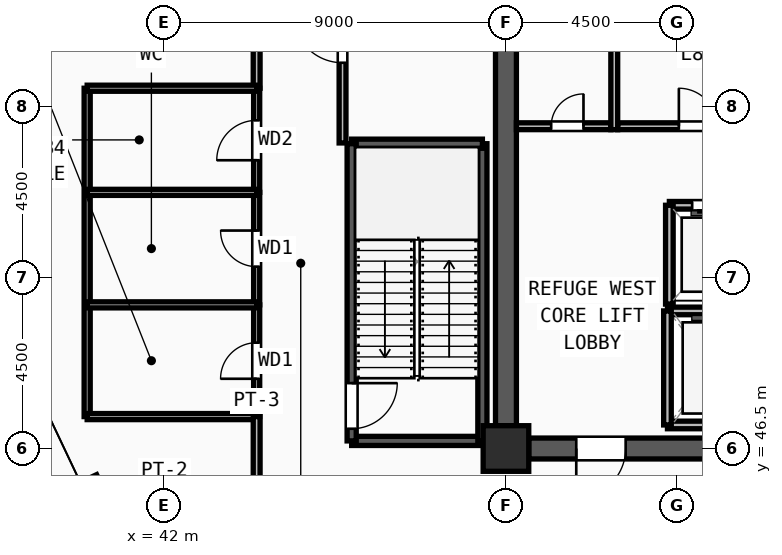
"""IFC4 building model, lengths in metres.
Left out: names, types, materials, properties, quantities, classifications, styles, units other than length and angle.
Written with IfcOpenShell. Run it as: python <this file> out.ifc"""

import sys

from ifc_helpers import new_model, si_unit, direction, frame, frame_2d, origin, origin_2d, place, context, subcontext, project, spatial, rectangle, extrude, source, transform, mapped, element, fill, save


model = new_model("IFC4")
c1 = context("Model", 3, precision=1e-05, world=origin(), true_north=direction((0.0, 1.0)))
c2 = subcontext(c1, "Body", "Model", "MODEL_VIEW")
j1 = project(units=[si_unit("LENGTHUNIT", "METRE"), si_unit("PLANEANGLEUNIT", "RADIAN")], contexts=[c1])
p1 = place(None, origin())
s1 = spatial("IfcSite", under=j1, at=p1, CompositionType="ELEMENT")
p2 = place(p1, origin())
s2 = spatial("IfcBuilding", under=s1, at=p2, CompositionType="ELEMENT")
p3 = place(p2, frame((0.0, 0.0, 324.0)))
s3 = spatial("IfcBuildingStorey", under=s2, at=p3, CompositionType="ELEMENT", Elevation=324.0)
m1 = source(origin(), c2, "Body", "SweptSolid", [
    extrude(rectangle(XDim=1.2, YDim=1.2, at=origin_2d()), origin(), (0.0, 0.0, 1.0), 4.5),
])
p4 = place(p3, frame((51.0, 46.5, 0.0), z_axis=(0.0, 0.0, 1.0), x_axis=(1.0, 0.0, 0.0)))
e1 = element("IfcColumn", 1, at=p4, inside=s3, PredefinedType="COLUMN", context=c2, shape_type="MappedRepresentation", body=[
    mapped(m1, transform((0.0, 0.0, 0.0), x_axis=(1.0, 0.0, 0.0), y_axis=(0.0, 1.0, 0.0), z_axis=(0.0, 0.0, 1.0), scale=1.0)),
])
m2 = source(origin(), c2, "Body", "SweptSolid", [
    extrude(rectangle(XDim=1.1, YDim=0.95, at=origin_2d()), origin(), (0.0, 0.0, 1.0), 4.5),
])
p5 = place(p3, frame((40.035, 45.112, 0.0), z_axis=(0.0, 0.0, 1.0), x_axis=(-0.427988927879, 0.903783977294, 0.0)))
e2 = element("IfcColumn", 2, at=p5, inside=s3, PredefinedType="COLUMN", context=c2, shape_type="MappedRepresentation", body=[
    mapped(m2, transform((0.0, 0.0, 0.0), x_axis=(1.0, 0.0, 0.0), y_axis=(0.0, 1.0, 0.0), z_axis=(0.0, 0.0, 1.0), scale=1.0)),
])
p6 = place(p3, frame((59.4, 46.5, 0.0), z_axis=(0.0, 0.0, 1.0), x_axis=(-1.0, 0.0, 0.0)))
e3 = element("IfcWall", 3, at=p6, inside=s3, PredefinedType="SHEAR", context=c2, shape_type="SweptSolid", body=[
    extrude(rectangle(XDim=7.8, YDim=0.55, at=frame_2d((3.9, 0.0))), origin(), (0.0, 0.0, 1.0), 4.32),
])
m3 = source(origin(), c2, "Body", "SweptSolid", [
    extrude(rectangle(XDim=1.3, YDim=2.2, at=frame_2d((0.65, 1.1))), frame((0.0, 0.285, 0.0), z_axis=(0.0, -1.0, 0.0), x_axis=(1.0, 0.0, 0.0)), (0.0, 0.0, 1.0), 0.57),
])
p7 = place(p6, frame((5.25, 0.0, 0.0)))
e4 = element("IfcOpeningElement", 4, at=p7, cuts=e3, PredefinedType="OPENING", context=c2, shape_type="MappedRepresentation", body=[
    mapped(m3, transform((0.0, 0.0, 0.0), x_axis=(1.0, 0.0, 0.0), y_axis=(0.0, 1.0, 0.0), z_axis=(0.0, 0.0, 1.0), scale=1.0)),
])
m4 = source(origin(), c2, "Body", "SweptSolid", [
    extrude(rectangle(XDim=1.0, YDim=2.2, at=frame_2d((0.5, 1.1))), frame((0.0, 0.285, 0.0), z_axis=(0.0, -1.0, 0.0), x_axis=(1.0, 0.0, 0.0)), (0.0, 0.0, 1.0), 0.57),
])
p8 = place(p6, frame((0.75, 0.0, 0.0)))
e5 = element("IfcOpeningElement", 5, at=p8, cuts=e3, PredefinedType="OPENING", context=c2, shape_type="MappedRepresentation", body=[
    mapped(m4, transform((0.0, 0.0, 0.0), x_axis=(1.0, 0.0, 0.0), y_axis=(0.0, 1.0, 0.0), z_axis=(0.0, 0.0, 1.0), scale=1.0)),
])
p9 = place(p3, frame((51.0, 47.1, 0.0), z_axis=(0.0, 0.0, 1.0), x_axis=(0.0, 1.0, 0.0)))
e6 = element("IfcWall", 6, at=p9, inside=s3, PredefinedType="SHEAR", context=c2, shape_type="SweptSolid", body=[
    extrude(rectangle(XDim=13.8, YDim=0.55, at=frame_2d((6.9, 0.0))), origin(), (0.0, 0.0, 1.0), 4.32),
])
p10 = place(p3, frame((46.94, 46.7, 0.0), z_axis=(0.0, 0.0, 1.0), x_axis=(1.0, 0.0, 0.0)))
e7 = element("IfcWall", 7, at=p10, inside=s3, PredefinedType="SOLIDWALL", context=c2, shape_type="SweptSolid", body=[
    extrude(rectangle(XDim=3.44, YDim=0.24, at=frame_2d((1.72, 0.0))), origin(), (0.0, 0.0, 1.0), 4.32),
])
p11 = place(p3, frame((50.38, 46.7, 0.0), z_axis=(0.0, 0.0, 1.0), x_axis=(0.0, 1.0, 0.0)))
e8 = element("IfcWall", 8, at=p11, inside=s3, PredefinedType="SOLIDWALL", context=c2, shape_type="SweptSolid", body=[
    extrude(rectangle(XDim=7.82, YDim=0.24, at=frame_2d((3.91, 0.0))), origin(), (0.0, 0.0, 1.0), 4.32),
])
p12 = place(p3, frame((50.38, 54.52, 0.0), z_axis=(0.0, 0.0, 1.0), x_axis=(-1.0, 0.0, 0.0)))
e9 = element("IfcWall", 9, at=p12, inside=s3, PredefinedType="SOLIDWALL", context=c2, shape_type="SweptSolid", body=[
    extrude(rectangle(XDim=3.44, YDim=0.24, at=frame_2d((1.72, 0.0))), origin(), (0.0, 0.0, 1.0), 4.32),
])
p13 = place(p3, frame((46.94, 54.52, 0.0), z_axis=(0.0, 0.0, 1.0), x_axis=(0.0, -1.0, 0.0)))
e10 = element("IfcWall", 10, at=p13, inside=s3, PredefinedType="SOLIDWALL", context=c2, shape_type="SweptSolid", body=[
    extrude(rectangle(XDim=7.82, YDim=0.24, at=frame_2d((3.91, 0.0))), origin(), (0.0, 0.0, 1.0), 4.32),
])
m5 = source(origin(), c2, "Body", "SweptSolid", [
    extrude(rectangle(XDim=1.2, YDim=2.2, at=frame_2d((0.6, 1.1))), frame((0.0, 0.13, 0.0), z_axis=(0.0, -1.0, 0.0), x_axis=(1.0, 0.0, 0.0)), (0.0, 0.0, 1.0), 0.26),
])
p14 = place(p13, frame((6.3, 0.0, 0.0)))
e11 = element("IfcOpeningElement", 11, at=p14, cuts=e10, PredefinedType="OPENING", context=c2, shape_type="MappedRepresentation", body=[
    mapped(m5, transform((0.0, 0.0, 0.0), x_axis=(1.0, 0.0, 0.0), y_axis=(0.0, 1.0, 0.0), z_axis=(0.0, 0.0, 1.0), scale=1.0)),
])
for number, where, z_axis, x_axis in (
    (12, (55.25, 47.12, 0.0), (0.0, 0.0, 1.0), (1.0, 0.0, 0.0)),
    (13, (57.65, 50.12, 0.0), (0.0, 0.0, 1.0), (-1.0, 0.0, 0.0)),
):
    element("IfcWall", number, at=place(p3, frame(where, z_axis=z_axis, x_axis=x_axis)), inside=s3, PredefinedType="SOLIDWALL", context=c2, shape_type="SweptSolid", body=[
        extrude(rectangle(XDim=2.4, YDim=0.2, at=frame_2d((1.2, 0.0))), origin(), (0.0, 0.0, 1.0), 4.32),
    ])
p15 = place(p3, frame((55.25, 50.12, 0.0), z_axis=(0.0, 0.0, 1.0), x_axis=(0.0, -1.0, 0.0)))
e14 = element("IfcWall", 14, at=p15, inside=s3, PredefinedType="SOLIDWALL", context=c2, shape_type="SweptSolid", body=[
    extrude(rectangle(XDim=3.0, YDim=0.2, at=frame_2d((1.5, 0.0))), origin(), (0.0, 0.0, 1.0), 4.32),
])
p16 = place(p3, frame((57.6, 52.9, 0.0), z_axis=(0.0, 0.0, 1.0), x_axis=(-1.0, 0.0, 0.0)))
e15 = element("IfcWall", 15, at=p16, inside=s3, PredefinedType="SOLIDWALL", context=c2, shape_type="SweptSolid", body=[
    extrude(rectangle(XDim=2.3, YDim=0.2, at=frame_2d((1.15, 0.0))), origin(), (0.0, 0.0, 1.0), 4.32),
])
m6 = source(origin(), c2, "Body", "SweptSolid", [
    extrude(rectangle(XDim=1.1, YDim=2.2, at=frame_2d((0.55, 1.1))), frame((0.0, 0.11, 0.0), z_axis=(0.0, -1.0, 0.0), x_axis=(1.0, 0.0, 0.0)), (0.0, 0.0, 1.0), 0.22),
])
p17 = place(p16, frame((0.6, 0.0, 0.0)))
e16 = element("IfcOpeningElement", 16, at=p17, cuts=e15, PredefinedType="OPENING", context=c2, shape_type="MappedRepresentation", body=[
    mapped(m6, transform((0.0, 0.0, 0.0), x_axis=(1.0, 0.0, 0.0), y_axis=(0.0, 1.0, 0.0), z_axis=(0.0, 0.0, 1.0), scale=1.0)),
])
p18 = place(p3, frame((55.3, 52.9, 0.0), z_axis=(0.0, 0.0, 1.0), x_axis=(0.0, -1.0, 0.0)))
e17 = element("IfcWall", 17, at=p18, inside=s3, PredefinedType="SOLIDWALL", context=c2, shape_type="SweptSolid", body=[
    extrude(rectangle(XDim=2.6, YDim=0.2, at=frame_2d((1.3, 0.0))), origin(), (0.0, 0.0, 1.0), 4.32),
])
p19 = place(p3, frame((53.94, 54.98, 0.0), z_axis=(0.0, 0.0, 1.0), x_axis=(1.0, 0.0, 0.0)))
e18 = element("IfcWall", 18, at=p19, inside=s3, PredefinedType="PARTITIONING", context=c2, shape_type="SweptSolid", body=[
    extrude(rectangle(XDim=4.22, YDim=0.18, at=frame_2d((2.11, 0.0))), origin(), (0.0, 0.0, 1.0), 4.32),
])
m7 = source(origin(), c2, "Body", "SweptSolid", [
    extrude(rectangle(XDim=1.0, YDim=2.2, at=frame_2d((0.5, 1.1))), frame((0.0, 0.1, 0.0), z_axis=(0.0, -1.0, 0.0), x_axis=(1.0, 0.0, 0.0)), (0.0, 0.0, 1.0), 0.2),
])
p20 = place(p19, frame((1.61, 0.0, 0.0)))
e19 = element("IfcOpeningElement", 19, at=p20, cuts=e18, PredefinedType="OPENING", context=c2, shape_type="MappedRepresentation", body=[
    mapped(m7, transform((0.0, 0.0, 0.0), x_axis=(1.0, 0.0, 0.0), y_axis=(0.0, 1.0, 0.0), z_axis=(0.0, 0.0, 1.0), scale=1.0)),
])
p21 = place(p3, frame((51.275, 54.98, 0.0), z_axis=(0.0, 0.0, 1.0), x_axis=(1.0, 0.0, 0.0)))
e20 = element("IfcWall", 20, at=p21, inside=s3, PredefinedType="PARTITIONING", context=c2, shape_type="SweptSolid", body=[
    extrude(rectangle(XDim=2.485, YDim=0.18, at=frame_2d((1.243, 0.0))), origin(), (0.0, 0.0, 1.0), 4.32),
])
m8 = source(origin(), c2, "Body", "SweptSolid", [
    extrude(rectangle(XDim=0.85, YDim=2.1, at=frame_2d((0.425, 1.05))), frame((0.0, 0.1, 0.0), z_axis=(0.0, -1.0, 0.0), x_axis=(1.0, 0.0, 0.0)), (0.0, 0.0, 1.0), 0.2),
])
p22 = place(p21, frame((0.915, 0.0, 0.0)))
e21 = element("IfcOpeningElement", 21, at=p22, cuts=e20, PredefinedType="OPENING", context=c2, shape_type="MappedRepresentation", body=[
    mapped(m8, transform((0.0, 0.0, 0.0), x_axis=(1.0, 0.0, 0.0), y_axis=(0.0, 1.0, 0.0), z_axis=(0.0, 0.0, 1.0), scale=1.0)),
])
p23 = place(p3, frame((44.44, 47.34, 0.0), z_axis=(0.0, 0.0, 1.0), x_axis=(0.0, 1.0, 0.0)))
e22 = element("IfcWall", 22, at=p23, inside=s3, PredefinedType="PARTITIONING", context=c2, shape_type="SweptSolid", body=[
    extrude(rectangle(XDim=2.94, YDim=0.16, at=frame_2d((1.47, 0.0))), origin(), (0.0, 0.0, 1.0), 4.32),
])
m9 = source(origin(), c2, "Body", "SweptSolid", [
    extrude(rectangle(XDim=0.95, YDim=2.15, at=frame_2d((0.475, 1.075))), frame((0.0, 0.09, 0.0), z_axis=(0.0, -1.0, 0.0), x_axis=(1.0, 0.0, 0.0)), (0.0, 0.0, 1.0), 0.18),
])
p24 = place(p23, frame((0.995, 0.0, 0.0)))
e23 = element("IfcOpeningElement", 23, at=p24, cuts=e22, PredefinedType="OPENING", context=c2, shape_type="MappedRepresentation", body=[
    mapped(m9, transform((0.0, 0.0, 0.0), x_axis=(1.0, 0.0, 0.0), y_axis=(0.0, 1.0, 0.0), z_axis=(0.0, 0.0, 1.0), scale=1.0)),
])
p25 = place(p3, frame((44.44, 50.28, 0.0), z_axis=(0.0, 0.0, 1.0), x_axis=(0.0, 1.0, 0.0)))
e24 = element("IfcWall", 24, at=p25, inside=s3, PredefinedType="PARTITIONING", context=c2, shape_type="SweptSolid", body=[
    extrude(rectangle(XDim=2.96, YDim=0.16, at=frame_2d((1.48, 0.0))), origin(), (0.0, 0.0, 1.0), 4.32),
])
p26 = place(p25, frame((1.005, 0.0, 0.0)))
e25 = element("IfcOpeningElement", 25, at=p26, cuts=e24, PredefinedType="OPENING", context=c2, shape_type="MappedRepresentation", body=[
    mapped(m9, transform((0.0, 0.0, 0.0), x_axis=(1.0, 0.0, 0.0), y_axis=(0.0, 1.0, 0.0), z_axis=(0.0, 0.0, 1.0), scale=1.0)),
])
p27 = place(p3, frame((44.44, 53.24, 0.0), z_axis=(0.0, 0.0, 1.0), x_axis=(0.0, 1.0, 0.0)))
e26 = element("IfcWall", 26, at=p27, inside=s3, PredefinedType="PARTITIONING", context=c2, shape_type="SweptSolid", body=[
    extrude(rectangle(XDim=2.74, YDim=0.16, at=frame_2d((1.37, 0.0))), origin(), (0.0, 0.0, 1.0), 4.011),
])
m10 = source(origin(), c2, "Body", "SweptSolid", [
    extrude(rectangle(XDim=1.05, YDim=2.15, at=frame_2d((0.525, 1.075))), frame((0.0, 0.09, 0.0), z_axis=(0.0, -1.0, 0.0), x_axis=(1.0, 0.0, 0.0)), (0.0, 0.0, 1.0), 0.18),
])
p28 = place(p27, frame((0.845, 0.0, 0.0)))
e27 = element("IfcOpeningElement", 27, at=p28, cuts=e26, PredefinedType="OPENING", context=c2, shape_type="MappedRepresentation", body=[
    mapped(m10, transform((0.0, 0.0, 0.0), x_axis=(1.0, 0.0, 0.0), y_axis=(0.0, 1.0, 0.0), z_axis=(0.0, 0.0, 1.0), scale=1.0)),
])
p29 = place(p3, frame((46.7, 54.54, 0.0), z_axis=(0.0, 0.0, 1.0), x_axis=(0.0, 1.0, 0.0)))
e28 = element("IfcWall", 28, at=p29, inside=s3, PredefinedType="PARTITIONING", context=c2, shape_type="SweptSolid", body=[
    extrude(rectangle(XDim=5.52, YDim=0.18, at=frame_2d((2.76, 0.0))), origin(), (0.0, 0.0, 1.0), 4.32),
])
m11 = source(origin(), c2, "Body", "SweptSolid", [
    extrude(rectangle(XDim=1.3, YDim=2.2, at=frame_2d((0.65, 1.1))), frame((0.0, 0.1, 0.0), z_axis=(0.0, -1.0, 0.0), x_axis=(1.0, 0.0, 0.0)), (0.0, 0.0, 1.0), 0.2),
])
p30 = place(p29, frame((2.11, 0.0, 0.0)))
e29 = element("IfcOpeningElement", 29, at=p30, cuts=e28, PredefinedType="OPENING", context=c2, shape_type="MappedRepresentation", body=[
    mapped(m11, transform((0.0, 0.0, 0.0), x_axis=(1.0, 0.0, 0.0), y_axis=(0.0, 1.0, 0.0), z_axis=(0.0, 0.0, 1.0), scale=1.0)),
])
p31 = place(p3, frame((44.44, 55.98, 0.0), z_axis=(0.0, 0.0, 1.0), x_axis=(0.0, 1.0, 0.0)))
e30 = element("IfcWall", 30, at=p31, inside=s3, PredefinedType="PARTITIONING", context=c2, shape_type="SweptSolid", body=[
    extrude(rectangle(XDim=11.035, YDim=0.18, at=frame_2d((5.518, 0.0))), origin(), (0.0, 0.0, 1.0), 4.32),
])
m12 = source(origin(), c2, "Body", "SweptSolid", [
    extrude(rectangle(XDim=1.4, YDim=2.25, at=frame_2d((0.7, 1.125))), frame((0.0, 0.1, 0.0), z_axis=(0.0, -1.0, 0.0), x_axis=(1.0, 0.0, 0.0)), (0.0, 0.0, 1.0), 0.2),
])
p32 = place(p31, frame((4.218, 0.0, 0.0)))
e31 = element("IfcOpeningElement", 31, at=p32, cuts=e30, PredefinedType="OPENING", context=c2, shape_type="MappedRepresentation", body=[
    mapped(m12, transform((0.0, 0.0, 0.0), x_axis=(1.0, 0.0, 0.0), y_axis=(0.0, 1.0, 0.0), z_axis=(0.0, 0.0, 1.0), scale=1.0)),
])
p33 = place(p3, frame((39.98, 47.34, 0.0), z_axis=(0.0, 0.0, 1.0), x_axis=(0.0, 1.0, 0.0)))
e32 = element("IfcWall", 32, at=p33, inside=s3, PredefinedType="PARTITIONING", context=c2, shape_type="SweptSolid", body=[
    extrude(rectangle(XDim=8.64, YDim=0.16, at=frame_2d((4.32, 0.0))), origin(), (0.0, 0.0, 1.0), 4.32),
])
for number, where, z_axis, x_axis in (
    (33, (39.98, 47.34, 0.0), (0.0, 0.0, 1.0), (1.0, 0.0, 0.0)),
    (34, (39.98, 50.28, 0.0), (0.0, 0.0, 1.0), (1.0, 0.0, 0.0)),
    (35, (39.98, 53.24, 0.0), (0.0, 0.0, 1.0), (1.0, 0.0, 0.0)),
    (36, (39.98, 55.98, 0.0), (0.0, 0.0, 1.0), (1.0, 0.0, 0.0)),
):
    element("IfcWall", number, at=place(p3, frame(where, z_axis=z_axis, x_axis=x_axis)), inside=s3, PredefinedType="PARTITIONING", context=c2, shape_type="SweptSolid", body=[
        extrude(rectangle(XDim=4.46, YDim=0.16, at=frame_2d((2.23, 0.0))), origin(), (0.0, 0.0, 1.0), 4.32),
    ])
p34 = place(p3, frame((44.44, 44.585, 0.0), z_axis=(0.0, 0.0, 1.0), x_axis=(0.0, 1.0, 0.0)))
e37 = element("IfcWall", 37, at=p34, inside=s3, PredefinedType="PARTITIONING", context=c2, shape_type="SweptSolid", body=[
    extrude(rectangle(XDim=2.755, YDim=0.18, at=frame_2d((1.377, 0.0))), origin(), (0.0, 0.0, 1.0), 4.32),
])
p35 = place(p3, frame((53.85, 54.89, 0.0), z_axis=(0.0, 0.0, 1.0), x_axis=(0.0, 1.0, 0.0)))
e38 = element("IfcWall", 38, at=p35, inside=s3, PredefinedType="PARTITIONING", context=c2, shape_type="SweptSolid", body=[
    extrude(rectangle(XDim=3.02, YDim=0.18, at=frame_2d((1.51, 0.0))), origin(), (0.0, 0.0, 1.0), 4.32),
])
m13 = source(origin(), c2, "Body", "SweptSolid", [
    extrude(rectangle(XDim=1.3, YDim=2.2, at=frame_2d((0.65, 1.1))), frame((0.0, 0.025, 0.0), z_axis=(0.0, -1.0, 0.0), x_axis=(1.0, 0.0, 0.0)), (0.0, 0.0, 1.0), 0.05),
])
p36 = place(p7, origin())
e39 = element("IfcDoor", 39, at=p36, inside=s3, OperationType="SINGLE_SWING_RIGHT", PredefinedType="DOOR", context=c2, shape_type="MappedRepresentation", body=[
    mapped(m13, transform((0.0, 0.0, 0.0), x_axis=(1.0, 0.0, 0.0), y_axis=(0.0, 1.0, 0.0), z_axis=(0.0, 0.0, 1.0), scale=1.0)),
])
fill(e4, e39)
m14 = source(origin(), c2, "Body", "SweptSolid", [
    extrude(rectangle(XDim=1.2, YDim=2.2, at=frame_2d((0.6, 1.1))), frame((0.0, 0.025, 0.0), z_axis=(0.0, -1.0, 0.0), x_axis=(1.0, 0.0, 0.0)), (0.0, 0.0, 1.0), 0.05),
])
p37 = place(p14, origin())
e40 = element("IfcDoor", 40, at=p37, inside=s3, OperationType="SINGLE_SWING_LEFT", PredefinedType="DOOR", context=c2, shape_type="MappedRepresentation", body=[
    mapped(m14, transform((0.0, 0.0, 0.0), x_axis=(1.0, 0.0, 0.0), y_axis=(0.0, 1.0, 0.0), z_axis=(0.0, 0.0, 1.0), scale=1.0)),
])
fill(e11, e40)
m15 = source(origin(), c2, "Body", "SweptSolid", [
    extrude(rectangle(XDim=1.1, YDim=2.2, at=frame_2d((0.55, 1.1))), frame((0.0, 0.025, 0.0), z_axis=(0.0, -1.0, 0.0), x_axis=(1.0, 0.0, 0.0)), (0.0, 0.0, 1.0), 0.05),
])
p38 = place(p17, origin())
e41 = element("IfcDoor", 41, at=p38, inside=s3, OperationType="SLIDING_TO_LEFT", PredefinedType="DOOR", context=c2, shape_type="MappedRepresentation", body=[
    mapped(m15, transform((0.0, 0.0, 0.0), x_axis=(1.0, 0.0, 0.0), y_axis=(0.0, 1.0, 0.0), z_axis=(0.0, 0.0, 1.0), scale=1.0)),
])
fill(e16, e41)
m16 = source(origin(), c2, "Body", "SweptSolid", [
    extrude(rectangle(XDim=1.0, YDim=2.2, at=frame_2d((0.5, 1.1))), frame((0.0, 0.025, 0.0), z_axis=(0.0, -1.0, 0.0), x_axis=(1.0, 0.0, 0.0)), (0.0, 0.0, 1.0), 0.05),
])
p39 = place(p20, origin())
e42 = element("IfcDoor", 42, at=p39, inside=s3, OperationType="SINGLE_SWING_LEFT", PredefinedType="DOOR", context=c2, shape_type="MappedRepresentation", body=[
    mapped(m16, transform((0.0, 0.0, 0.0), x_axis=(1.0, 0.0, 0.0), y_axis=(0.0, 1.0, 0.0), z_axis=(0.0, 0.0, 1.0), scale=1.0)),
])
fill(e19, e42)
m17 = source(origin(), c2, "Body", "SweptSolid", [
    extrude(rectangle(XDim=0.85, YDim=2.1, at=frame_2d((0.425, 1.05))), frame((0.0, 0.025, 0.0), z_axis=(0.0, -1.0, 0.0), x_axis=(1.0, 0.0, 0.0)), (0.0, 0.0, 1.0), 0.05),
])
p40 = place(p22, origin())
e43 = element("IfcDoor", 43, at=p40, inside=s3, OperationType="SINGLE_SWING_RIGHT", PredefinedType="DOOR", context=c2, shape_type="MappedRepresentation", body=[
    mapped(m17, transform((0.0, 0.0, 0.0), x_axis=(1.0, 0.0, 0.0), y_axis=(0.0, 1.0, 0.0), z_axis=(0.0, 0.0, 1.0), scale=1.0)),
])
fill(e21, e43)
m18 = source(origin(), c2, "Body", "SweptSolid", [
    extrude(rectangle(XDim=0.95, YDim=2.15, at=frame_2d((0.475, 1.075))), frame((0.0, 0.025, 0.0), z_axis=(0.0, -1.0, 0.0), x_axis=(1.0, 0.0, 0.0)), (0.0, 0.0, 1.0), 0.05),
])
p41 = place(p24, origin())
e44 = element("IfcDoor", 44, at=p41, inside=s3, OperationType="SINGLE_SWING_LEFT", PredefinedType="DOOR", context=c2, shape_type="MappedRepresentation", body=[
    mapped(m18, transform((0.0, 0.0, 0.0), x_axis=(1.0, 0.0, 0.0), y_axis=(0.0, 1.0, 0.0), z_axis=(0.0, 0.0, 1.0), scale=1.0)),
])
fill(e23, e44)
p42 = place(p26, origin())
e45 = element("IfcDoor", 45, at=p42, inside=s3, OperationType="SINGLE_SWING_RIGHT", PredefinedType="DOOR", context=c2, shape_type="MappedRepresentation", body=[
    mapped(m18, transform((0.0, 0.0, 0.0), x_axis=(1.0, 0.0, 0.0), y_axis=(0.0, 1.0, 0.0), z_axis=(0.0, 0.0, 1.0), scale=1.0)),
])
fill(e25, e45)
m19 = source(origin(), c2, "Body", "SweptSolid", [
    extrude(rectangle(XDim=1.05, YDim=2.15, at=frame_2d((0.525, 1.075))), frame((0.0, 0.025, 0.0), z_axis=(0.0, -1.0, 0.0), x_axis=(1.0, 0.0, 0.0)), (0.0, 0.0, 1.0), 0.05),
])
p43 = place(p28, origin())
e46 = element("IfcDoor", 46, at=p43, inside=s3, OperationType="SINGLE_SWING_LEFT", PredefinedType="DOOR", context=c2, shape_type="MappedRepresentation", body=[
    mapped(m19, transform((0.0, 0.0, 0.0), x_axis=(1.0, 0.0, 0.0), y_axis=(0.0, 1.0, 0.0), z_axis=(0.0, 0.0, 1.0), scale=1.0)),
])
fill(e27, e46)
p44 = place(p30, origin())
e47 = element("IfcDoor", 47, at=p44, inside=s3, OperationType="SINGLE_SWING_RIGHT", PredefinedType="DOOR", context=c2, shape_type="MappedRepresentation", body=[
    mapped(m13, transform((0.0, 0.0, 0.0), x_axis=(1.0, 0.0, 0.0), y_axis=(0.0, 1.0, 0.0), z_axis=(0.0, 0.0, 1.0), scale=1.0)),
])
fill(e29, e47)
save(model, sys.argv[1])
